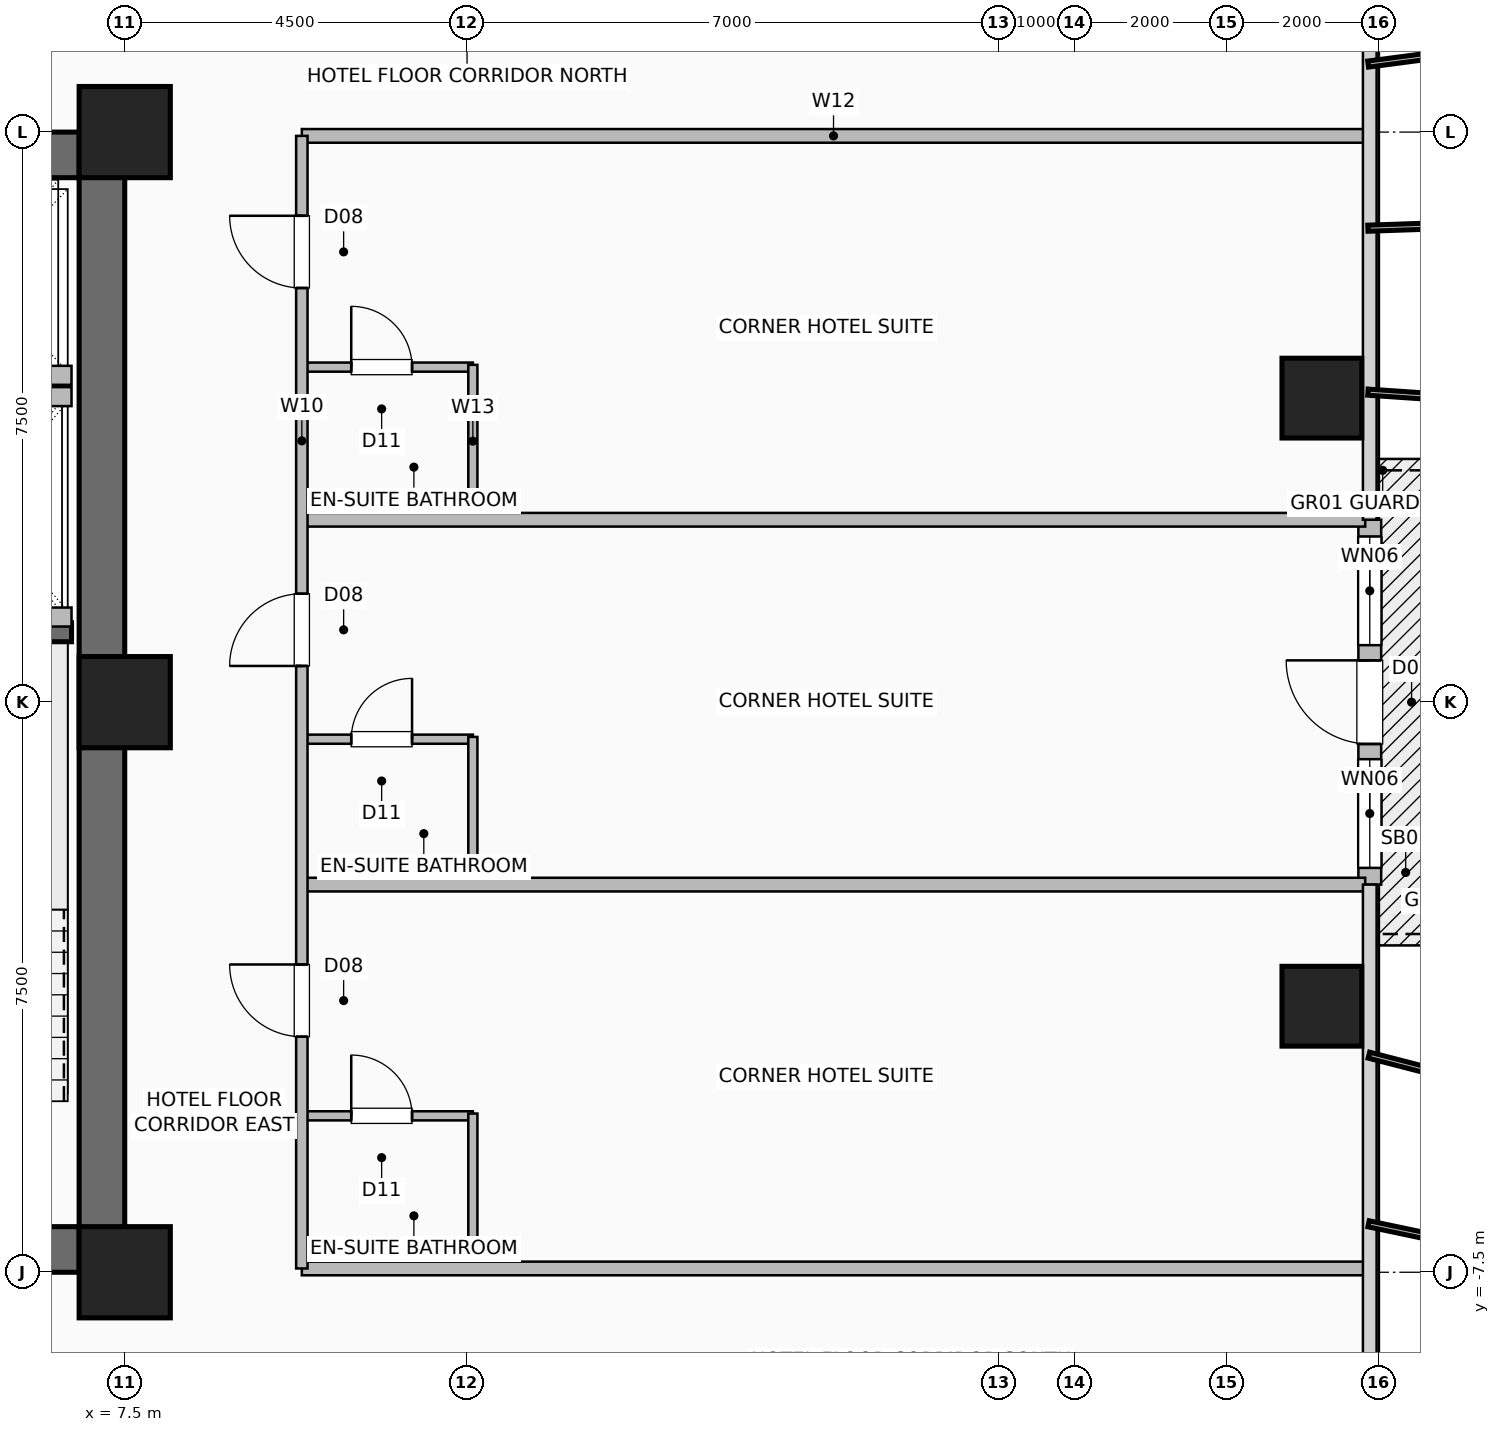
"""IFC4 building model, lengths in metres.
Left out: names, types, materials, properties, quantities, classifications, styles, units other than length and angle.
Written with IfcOpenShell. Run it as: python <this file> out.ifc"""

import sys

from ifc_helpers import new_model, si_unit, direction, frame, frame_2d, origin, origin_2d, place, context, subcontext, project, spatial, rectangle, hollow_rectangle, extrude, element, fill, save


model = new_model("IFC4")
c1 = context("Model", 3, precision=1e-05, world=origin(), true_north=direction((0.0, 1.0)))
c2 = subcontext(c1, "Body", "Model", "MODEL_VIEW")
j1 = project(units=[si_unit("LENGTHUNIT", "METRE"), si_unit("PLANEANGLEUNIT", "RADIAN")], contexts=[c1])
p1 = place(None, origin())
s1 = spatial("IfcSite", under=j1, at=p1, CompositionType="ELEMENT")
p2 = place(p1, origin())
s2 = spatial("IfcBuilding", under=s1, at=p2, CompositionType="ELEMENT")
p3 = place(p2, frame((0.0, 0.0, 48.0)))
s3 = spatial("IfcBuildingStorey", under=s2, at=p3, CompositionType="ELEMENT", Elevation=48.0)
for number, where, z_axis, x_axis in (
    (1, (7.5, -7.5, 0.0), (0.0, 0.0, 1.0), (1.0, 0.0, 0.0)),
    (2, (7.5, 0.0, 0.0), (0.0, 0.0, 1.0), (1.0, 0.0, 0.0)),
    (3, (7.5, 7.5, 0.0), (0.0, 0.0, 1.0), (1.0, 0.0, 0.0)),
):
    element("IfcColumn", number, at=place(p3, frame(where, z_axis=z_axis, x_axis=x_axis)), inside=s3, PredefinedType="COLUMN", context=c2, shape_type="SweptSolid", body=[
        extrude(hollow_rectangle(XDim=1.2, YDim=1.2, WallThickness=0.055, at=origin_2d()), origin(), (0.0, 0.0, 1.0), 3.5),
    ])
for number, where, z_axis, x_axis in (
    (4, (23.25, -4.0, 0.0), (0.0, 0.0, 1.0), (1.0, 0.0, 0.0)),
    (5, (23.25, 4.0, 0.0), (0.0, 0.0, 1.0), (1.0, 0.0, 0.0)),
):
    element("IfcColumn", number, at=place(p3, frame(where, z_axis=z_axis, x_axis=x_axis)), inside=s3, PredefinedType="COLUMN", context=c2, shape_type="SweptSolid", body=[
        extrude(hollow_rectangle(XDim=1.05, YDim=1.05, WallThickness=0.05, at=origin_2d()), origin(), (0.0, 0.0, 1.0), 3.5),
    ])
p4 = place(p3, frame((23.88, -2.4, 0.0), z_axis=(0.0, 0.0, 1.0), x_axis=(0.0, 1.0, 0.0)))
e6 = element("IfcWall", 6, at=p4, inside=s3, PredefinedType="SOLIDWALL", context=c2, shape_type="SweptSolid", body=[
    extrude(rectangle(XDim=4.8, YDim=0.3, at=frame_2d((2.4, 0.0))), origin(), (0.0, 0.0, 1.0), 3.25),
])
p5 = place(p4, frame((1.85, 0.0, 0.0)))
e7 = element("IfcOpeningElement", 7, at=p5, cuts=e6, PredefinedType="OPENING", context=c2, shape_type="SweptSolid", body=[
    extrude(rectangle(XDim=1.1, YDim=2.2, at=frame_2d((0.55, 1.1))), frame((0.0, 0.16, 0.0), z_axis=(0.0, -1.0, 0.0), x_axis=(1.0, 0.0, 0.0)), (0.0, 0.0, 1.0), 0.32),
])
p6 = place(p4, frame((0.22, 0.0, 0.85)))
e8 = element("IfcOpeningElement", 8, at=p6, cuts=e6, PredefinedType="OPENING", context=c2, shape_type="SweptSolid", body=[
    extrude(rectangle(XDim=1.43, YDim=1.8, at=frame_2d((0.715, 0.9))), frame((0.0, 0.16, 0.0), z_axis=(0.0, -1.0, 0.0), x_axis=(1.0, 0.0, 0.0)), (0.0, 0.0, 1.0), 0.32),
])
p7 = place(p4, frame((3.15, 0.0, 0.85)))
e9 = element("IfcOpeningElement", 9, at=p7, cuts=e6, PredefinedType="OPENING", context=c2, shape_type="SweptSolid", body=[
    extrude(rectangle(XDim=1.43, YDim=1.8, at=frame_2d((0.715, 0.9))), frame((0.0, 0.16, 0.0), z_axis=(0.0, -1.0, 0.0), x_axis=(1.0, 0.0, 0.0)), (0.0, 0.0, 1.0), 0.32),
])
p8 = place(p3, frame((-7.5, -7.2, 0.0), z_axis=(0.0, 0.0, 1.0), x_axis=(1.0, 0.0, 0.0)))
e10 = element("IfcWall", 10, at=p8, inside=s3, PredefinedType="SHEAR", context=c2, shape_type="SweptSolid", body=[
    extrude(rectangle(XDim=15.0, YDim=0.6, at=frame_2d((7.5, 0.0))), origin(), (0.0, 0.0, 1.0), 3.25),
])
p9 = place(p8, frame((1.55, 0.0, 0.0)))
e11 = element("IfcOpeningElement", 11, at=p9, cuts=e10, PredefinedType="OPENING", context=c2, shape_type="SweptSolid", body=[
    extrude(rectangle(XDim=1.05, YDim=2.08, at=frame_2d((0.525, 1.04))), frame((0.0, 0.31, 0.0), z_axis=(0.0, -1.0, 0.0), x_axis=(1.0, 0.0, 0.0)), (0.0, 0.0, 1.0), 0.62),
])
p10 = place(p8, frame((12.4, 0.0, 0.0)))
e12 = element("IfcOpeningElement", 12, at=p10, cuts=e10, PredefinedType="OPENING", context=c2, shape_type="SweptSolid", body=[
    extrude(rectangle(XDim=1.05, YDim=2.08, at=frame_2d((0.525, 1.04))), frame((0.0, 0.31, 0.0), z_axis=(0.0, -1.0, 0.0), x_axis=(1.0, 0.0, 0.0)), (0.0, 0.0, 1.0), 0.62),
])
p11 = place(p8, frame((4.64, 0.0, 0.0)))
e13 = element("IfcOpeningElement", 13, at=p11, cuts=e10, PredefinedType="OPENING", context=c2, shape_type="SweptSolid", body=[
    extrude(rectangle(XDim=1.1, YDim=2.2, at=frame_2d((0.55, 1.1))), frame((0.0, 0.31, 0.0), z_axis=(0.0, -1.0, 0.0), x_axis=(1.0, 0.0, 0.0)), (0.0, 0.0, 1.0), 0.62),
])
p12 = place(p8, frame((6.52, 0.0, 0.0)))
e14 = element("IfcOpeningElement", 14, at=p12, cuts=e10, PredefinedType="OPENING", context=c2, shape_type="SweptSolid", body=[
    extrude(rectangle(XDim=1.1, YDim=2.2, at=frame_2d((0.55, 1.1))), frame((0.0, 0.31, 0.0), z_axis=(0.0, -1.0, 0.0), x_axis=(1.0, 0.0, 0.0)), (0.0, 0.0, 1.0), 0.62),
])
p13 = place(p8, frame((8.4, 0.0, 0.0)))
e15 = element("IfcOpeningElement", 15, at=p13, cuts=e10, PredefinedType="OPENING", context=c2, shape_type="SweptSolid", body=[
    extrude(rectangle(XDim=1.1, YDim=2.2, at=frame_2d((0.55, 1.1))), frame((0.0, 0.31, 0.0), z_axis=(0.0, -1.0, 0.0), x_axis=(1.0, 0.0, 0.0)), (0.0, 0.0, 1.0), 0.62),
])
for number, where, z_axis, x_axis in (
    (16, (-7.5, 7.2, 0.0), (0.0, 0.0, 1.0), (1.0, 0.0, 0.0)),
    (17, (7.2, -7.5, 0.0), (0.0, 0.0, 1.0), (0.0, 1.0, 0.0)),
):
    element("IfcWall", number, at=place(p3, frame(where, z_axis=z_axis, x_axis=x_axis)), inside=s3, PredefinedType="SHEAR", context=c2, shape_type="SweptSolid", body=[
        extrude(rectangle(XDim=15.0, YDim=0.6, at=frame_2d((7.5, 0.0))), origin(), (0.0, 0.0, 1.0), 3.25),
    ])
p14 = place(p3, frame((3.47, 0.92, 0.0), z_axis=(0.0, 0.0, 1.0), x_axis=(1.0, 0.0, 0.0)))
e18 = element("IfcWall", 18, at=p14, inside=s3, PredefinedType="SHEAR", context=c2, shape_type="SweptSolid", body=[
    extrude(rectangle(XDim=3.33, YDim=0.25, at=frame_2d((1.665, 0.0))), origin(), (0.0, 0.0, 1.0), 3.25),
])
p15 = place(p3, frame((4.38, 4.3, 0.0), z_axis=(0.0, 0.0, 1.0), x_axis=(1.0, 0.0, 0.0)))
e19 = element("IfcWall", 19, at=p15, inside=s3, PredefinedType="SHEAR", context=c2, shape_type="SweptSolid", body=[
    extrude(rectangle(XDim=2.42, YDim=0.25, at=frame_2d((1.21, 0.0))), origin(), (0.0, 0.0, 1.0), 3.25),
])
for number, where, z_axis, x_axis in (
    (20, (4.28, 1.12, 0.0), (0.0, 0.0, 1.0), (1.0, 0.0, 0.0)),
    (21, (4.28, 4.02, 0.0), (0.0, 0.0, 1.0), (1.0, 0.0, 0.0)),
):
    element("IfcWall", number, at=place(p3, frame(where, z_axis=z_axis, x_axis=x_axis)), inside=s3, PredefinedType="SHEAR", context=c2, shape_type="SweptSolid", body=[
        extrude(rectangle(XDim=2.52, YDim=0.25, at=frame_2d((1.26, 0.0))), origin(), (0.0, 0.0, 1.0), 3.25),
    ])
p16 = place(p3, frame((9.83, -5.442, 0.0), z_axis=(0.0, 0.0, 1.0), x_axis=(1.0, 0.0, 0.0)))
e22 = element("IfcWall", 22, at=p16, inside=s3, PredefinedType="PLUMBINGWALL", context=c2, shape_type="SweptSolid", body=[
    extrude(rectangle(XDim=2.25, YDim=0.12, at=frame_2d((1.125, 0.0))), origin(), (0.0, 0.0, 1.0), 3.25),
])
p17 = place(p16, frame((0.65, 0.0, 0.0)))
e23 = element("IfcOpeningElement", 23, at=p17, cuts=e22, PredefinedType="OPENING", context=c2, shape_type="SweptSolid", body=[
    extrude(rectangle(XDim=0.8, YDim=2.05, at=frame_2d((0.4, 1.025))), frame((0.0, 0.07, 0.0), z_axis=(0.0, -1.0, 0.0), x_axis=(1.0, 0.0, 0.0)), (0.0, 0.0, 1.0), 0.14),
])
p18 = place(p3, frame((12.08, -7.42, 0.0), z_axis=(0.0, 0.0, 1.0), x_axis=(0.0, 1.0, 0.0)))
e24 = element("IfcWall", 24, at=p18, inside=s3, PredefinedType="PLUMBINGWALL", context=c2, shape_type="SweptSolid", body=[
    extrude(rectangle(XDim=2.008, YDim=0.12, at=frame_2d((1.004, 0.0))), origin(), (0.0, 0.0, 1.0), 3.25),
])
p19 = place(p3, frame((9.83, -0.487, 0.0), z_axis=(0.0, 0.0, 1.0), x_axis=(1.0, 0.0, 0.0)))
e25 = element("IfcWall", 25, at=p19, inside=s3, PredefinedType="PLUMBINGWALL", context=c2, shape_type="SweptSolid", body=[
    extrude(rectangle(XDim=2.25, YDim=0.12, at=frame_2d((1.125, 0.0))), origin(), (0.0, 0.0, 1.0), 3.25),
])
p20 = place(p19, frame((0.65, 0.0, 0.0)))
e26 = element("IfcOpeningElement", 26, at=p20, cuts=e25, PredefinedType="OPENING", context=c2, shape_type="SweptSolid", body=[
    extrude(rectangle(XDim=0.8, YDim=2.05, at=frame_2d((0.4, 1.025))), frame((0.0, 0.07, 0.0), z_axis=(0.0, -1.0, 0.0), x_axis=(1.0, 0.0, 0.0)), (0.0, 0.0, 1.0), 0.14),
])
p21 = place(p3, frame((12.08, -2.37, 0.0), z_axis=(0.0, 0.0, 1.0), x_axis=(0.0, 1.0, 0.0)))
e27 = element("IfcWall", 27, at=p21, inside=s3, PredefinedType="PLUMBINGWALL", context=c2, shape_type="SweptSolid", body=[
    extrude(rectangle(XDim=1.913, YDim=0.12, at=frame_2d((0.957, 0.0))), origin(), (0.0, 0.0, 1.0), 3.25),
])
p22 = place(p3, frame((9.83, 4.408, 0.0), z_axis=(0.0, 0.0, 1.0), x_axis=(1.0, 0.0, 0.0)))
e28 = element("IfcWall", 28, at=p22, inside=s3, PredefinedType="PLUMBINGWALL", context=c2, shape_type="SweptSolid", body=[
    extrude(rectangle(XDim=2.25, YDim=0.12, at=frame_2d((1.125, 0.0))), origin(), (0.0, 0.0, 1.0), 3.25),
])
p23 = place(p22, frame((0.65, 0.0, 0.0)))
e29 = element("IfcOpeningElement", 29, at=p23, cuts=e28, PredefinedType="OPENING", context=c2, shape_type="SweptSolid", body=[
    extrude(rectangle(XDim=0.8, YDim=2.05, at=frame_2d((0.4, 1.025))), frame((0.0, 0.07, 0.0), z_axis=(0.0, -1.0, 0.0), x_axis=(1.0, 0.0, 0.0)), (0.0, 0.0, 1.0), 0.14),
])
p24 = place(p3, frame((12.08, 2.43, 0.0), z_axis=(0.0, 0.0, 1.0), x_axis=(0.0, 1.0, 0.0)))
e30 = element("IfcWall", 30, at=p24, inside=s3, PredefinedType="PLUMBINGWALL", context=c2, shape_type="SweptSolid", body=[
    extrude(rectangle(XDim=2.008, YDim=0.12, at=frame_2d((1.004, 0.0))), origin(), (0.0, 0.0, 1.0), 3.25),
])
for number, where, z_axis, x_axis in (
    (31, (9.83, -7.45, 0.0), (0.0, 0.0, 1.0), (1.0, 0.0, 0.0)),
    (32, (9.83, -2.4, 0.0), (0.0, 0.0, 1.0), (1.0, 0.0, 0.0)),
    (33, (9.83, 2.4, 0.0), (0.0, 0.0, 1.0), (1.0, 0.0, 0.0)),
    (34, (9.83, 7.45, 0.0), (0.0, 0.0, 1.0), (1.0, 0.0, 0.0)),
):
    element("IfcWall", number, at=place(p3, frame(where, z_axis=z_axis, x_axis=x_axis)), inside=s3, PredefinedType="PARTITIONING", context=c2, shape_type="SweptSolid", body=[
        extrude(rectangle(XDim=13.99, YDim=0.18, at=frame_2d((6.995, 0.0))), origin(), (0.0, 0.0, 1.0), 3.25),
    ])
p25 = place(p3, frame((9.83, -7.45, 0.0), z_axis=(0.0, 0.0, 1.0), x_axis=(0.0, 1.0, 0.0)))
e35 = element("IfcWall", 35, at=p25, inside=s3, PredefinedType="PARTITIONING", context=c2, shape_type="SweptSolid", body=[
    extrude(rectangle(XDim=14.9, YDim=0.15, at=frame_2d((7.45, 0.0))), origin(), (0.0, 0.0, 1.0), 3.25),
])
p26 = place(p25, frame((3.049, 0.0, 0.0)))
e36 = element("IfcOpeningElement", 36, at=p26, cuts=e35, PredefinedType="OPENING", context=c2, shape_type="SweptSolid", body=[
    extrude(rectangle(XDim=0.95, YDim=2.08, at=frame_2d((0.475, 1.04))), frame((0.0, 0.085, 0.0), z_axis=(0.0, -1.0, 0.0), x_axis=(1.0, 0.0, 0.0)), (0.0, 0.0, 1.0), 0.17),
])
p27 = place(p25, frame((7.927, 0.0, 0.0)))
e37 = element("IfcOpeningElement", 37, at=p27, cuts=e35, PredefinedType="OPENING", context=c2, shape_type="SweptSolid", body=[
    extrude(rectangle(XDim=0.95, YDim=2.08, at=frame_2d((0.475, 1.04))), frame((0.0, 0.085, 0.0), z_axis=(0.0, -1.0, 0.0), x_axis=(1.0, 0.0, 0.0)), (0.0, 0.0, 1.0), 0.17),
])
p28 = place(p25, frame((12.899, 0.0, 0.0)))
e38 = element("IfcOpeningElement", 38, at=p28, cuts=e35, PredefinedType="OPENING", context=c2, shape_type="SweptSolid", body=[
    extrude(rectangle(XDim=0.95, YDim=2.08, at=frame_2d((0.475, 1.04))), frame((0.0, 0.085, 0.0), z_axis=(0.0, -1.0, 0.0), x_axis=(1.0, 0.0, 0.0)), (0.0, 0.0, 1.0), 0.17),
])
p29 = place(p5, origin())
e39 = element("IfcDoor", 39, at=p29, inside=s3, OperationType="SINGLE_SWING_RIGHT", PredefinedType="DOOR", context=c2, shape_type="SweptSolid", body=[
    extrude(rectangle(XDim=1.1, YDim=2.2, at=frame_2d((0.55, 1.1))), frame((0.0, 0.025, 0.0), z_axis=(0.0, -1.0, 0.0), x_axis=(1.0, 0.0, 0.0)), (0.0, 0.0, 1.0), 0.05),
])
fill(e7, e39)
p30 = place(p6, origin())
e40 = element("IfcWindow", 40, at=p30, inside=s3, PartitioningType="SINGLE_PANEL", PredefinedType="WINDOW", context=c2, shape_type="SweptSolid", body=[
    extrude(rectangle(XDim=1.43, YDim=1.8, at=frame_2d((0.715, 0.9))), frame((0.0, 0.03, 0.0), z_axis=(0.0, -1.0, 0.0), x_axis=(1.0, 0.0, 0.0)), (0.0, 0.0, 1.0), 0.06),
])
fill(e8, e40)
p31 = place(p7, origin())
e41 = element("IfcWindow", 41, at=p31, inside=s3, PartitioningType="SINGLE_PANEL", PredefinedType="WINDOW", context=c2, shape_type="SweptSolid", body=[
    extrude(rectangle(XDim=1.43, YDim=1.8, at=frame_2d((0.715, 0.9))), frame((0.0, 0.03, 0.0), z_axis=(0.0, -1.0, 0.0), x_axis=(1.0, 0.0, 0.0)), (0.0, 0.0, 1.0), 0.06),
])
fill(e9, e41)
p32 = place(p17, origin())
e42 = element("IfcDoor", 42, at=p32, inside=s3, OperationType="SINGLE_SWING_LEFT", PredefinedType="DOOR", context=c2, shape_type="SweptSolid", body=[
    extrude(rectangle(XDim=0.8, YDim=2.05, at=frame_2d((0.4, 1.025))), frame((0.0, 0.025, 0.0), z_axis=(0.0, -1.0, 0.0), x_axis=(1.0, 0.0, 0.0)), (0.0, 0.0, 1.0), 0.05),
])
fill(e23, e42)
p33 = place(p20, origin())
e43 = element("IfcDoor", 43, at=p33, inside=s3, OperationType="SINGLE_SWING_RIGHT", PredefinedType="DOOR", context=c2, shape_type="SweptSolid", body=[
    extrude(rectangle(XDim=0.8, YDim=2.05, at=frame_2d((0.4, 1.025))), frame((0.0, 0.025, 0.0), z_axis=(0.0, -1.0, 0.0), x_axis=(1.0, 0.0, 0.0)), (0.0, 0.0, 1.0), 0.05),
])
fill(e26, e43)
p34 = place(p23, origin())
e44 = element("IfcDoor", 44, at=p34, inside=s3, OperationType="SINGLE_SWING_LEFT", PredefinedType="DOOR", context=c2, shape_type="SweptSolid", body=[
    extrude(rectangle(XDim=0.8, YDim=2.05, at=frame_2d((0.4, 1.025))), frame((0.0, 0.025, 0.0), z_axis=(0.0, -1.0, 0.0), x_axis=(1.0, 0.0, 0.0)), (0.0, 0.0, 1.0), 0.05),
])
fill(e29, e44)
p35 = place(p26, origin())
e45 = element("IfcDoor", 45, at=p35, inside=s3, OperationType="SINGLE_SWING_RIGHT", PredefinedType="DOOR", context=c2, shape_type="SweptSolid", body=[
    extrude(rectangle(XDim=0.95, YDim=2.08, at=frame_2d((0.475, 1.04))), frame((0.0, 0.025, 0.0), z_axis=(0.0, -1.0, 0.0), x_axis=(1.0, 0.0, 0.0)), (0.0, 0.0, 1.0), 0.05),
])
fill(e36, e45)
p36 = place(p27, origin())
e46 = element("IfcDoor", 46, at=p36, inside=s3, OperationType="SINGLE_SWING_LEFT", PredefinedType="DOOR", context=c2, shape_type="SweptSolid", body=[
    extrude(rectangle(XDim=0.95, YDim=2.08, at=frame_2d((0.475, 1.04))), frame((0.0, 0.025, 0.0), z_axis=(0.0, -1.0, 0.0), x_axis=(1.0, 0.0, 0.0)), (0.0, 0.0, 1.0), 0.05),
])
fill(e37, e46)
p37 = place(p28, origin())
e47 = element("IfcDoor", 47, at=p37, inside=s3, OperationType="SINGLE_SWING_RIGHT", PredefinedType="DOOR", context=c2, shape_type="SweptSolid", body=[
    extrude(rectangle(XDim=0.95, YDim=2.08, at=frame_2d((0.475, 1.04))), frame((0.0, 0.025, 0.0), z_axis=(0.0, -1.0, 0.0), x_axis=(1.0, 0.0, 0.0)), (0.0, 0.0, 1.0), 0.05),
])
fill(e38, e47)
save(model, sys.argv[1])
